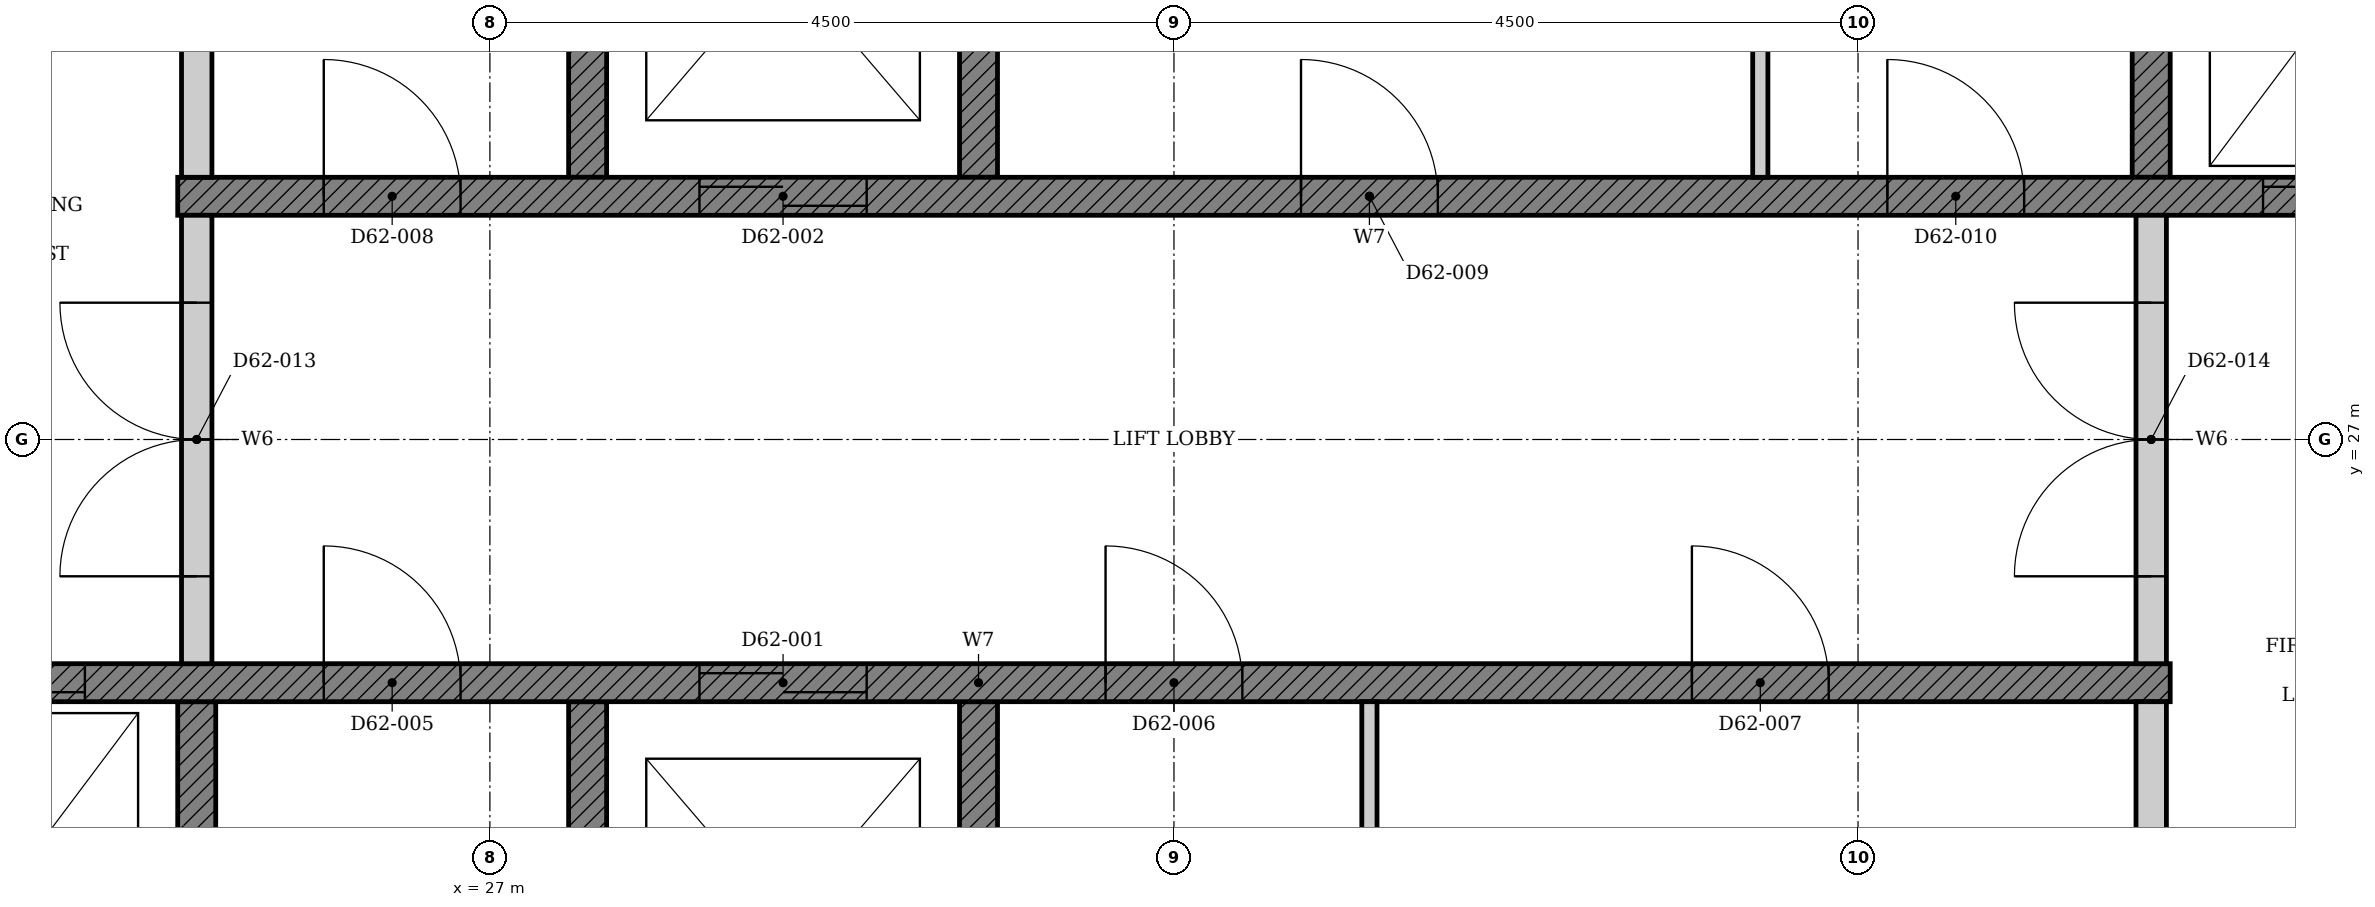
"""IFC4 building model, lengths in metres.
Left out: names, types, materials, properties, quantities, classifications, styles, units other than length and angle.
Written with IfcOpenShell. Run it as: python <this file> out.ifc"""

import sys

from ifc_helpers import new_model, si_unit, direction, frame, frame_2d, origin, place, context, subcontext, project, spatial, polyline, rectangle, outline, extrude, element, fill, save


model = new_model("IFC4")
c1 = context("Model", 3, precision=1e-05, world=origin(), true_north=direction((0.0, 1.0)))
c2 = subcontext(c1, "Body", "Model", "MODEL_VIEW")
j1 = project(units=[si_unit("LENGTHUNIT", "METRE"), si_unit("PLANEANGLEUNIT", "RADIAN")], contexts=[c1])
p1 = place(None, origin())
s1 = spatial("IfcSite", under=j1, at=p1, CompositionType="ELEMENT")
p2 = place(p1, origin())
s2 = spatial("IfcBuilding", under=s1, at=p2, CompositionType="ELEMENT")
p3 = place(p2, frame((0.0, 0.0, 245.3)))
s3 = spatial("IfcBuildingStorey", under=s2, at=p3, CompositionType="ELEMENT", Elevation=245.3)
p4 = place(p3, origin())
e1 = element("IfcWall", 1, at=p4, inside=s3, PredefinedType="SHEAR", context=c2, shape_type="SweptSolid", body=[
    extrude(outline(polyline([(22.375, 22.35), (25.197, 22.35), (25.197, 25.275), (24.947, 25.275), (24.947, 22.65), (22.625, 22.65), (22.625, 25.275), (22.375, 25.275), (22.375, 22.35)])), origin(), (0.0, 0.0, 1.0), 3.4),
])
p5 = place(p3, origin())
e2 = element("IfcWall", 2, at=p5, inside=s3, PredefinedType="SHEAR", context=c2, shape_type="SweptSolid", body=[
    extrude(outline(polyline([(27.518, 22.35), (30.339, 22.35), (30.339, 25.275), (30.089, 25.275), (30.089, 22.65), (27.768, 22.65), (27.768, 25.275), (27.518, 25.275), (27.518, 22.35)])), origin(), (0.0, 0.0, 1.0), 3.4),
])
p6 = place(p3, origin())
e3 = element("IfcWall", 3, at=p6, inside=s3, PredefinedType="SHEAR", context=c2, shape_type="SweptSolid", body=[
    extrude(outline(polyline([(27.518, 28.725), (27.768, 28.725), (27.768, 31.35), (30.089, 31.35), (30.089, 28.725), (30.339, 28.725), (30.339, 31.65), (27.518, 31.65), (27.518, 28.725)])), origin(), (0.0, 0.0, 1.0), 3.4),
])
p7 = place(p3, origin())
e4 = element("IfcWall", 4, at=p7, inside=s3, PredefinedType="SHEAR", context=c2, shape_type="SweptSolid", body=[
    extrude(outline(polyline([(37.803, 28.725), (38.053, 28.725), (38.053, 31.35), (40.375, 31.35), (40.375, 28.725), (40.625, 28.725), (40.625, 31.65), (37.803, 31.65), (37.803, 28.725)])), origin(), (0.0, 0.0, 1.0), 3.4),
])
p8 = place(p3, frame((22.375, 25.4, 0.0), z_axis=(0.0, 0.0, 1.0), x_axis=(1.0, 0.0, 0.0)))
e5 = element("IfcWall", 5, at=p8, inside=s3, PredefinedType="SHEAR", context=c2, shape_type="SweptSolid", body=[
    extrude(rectangle(XDim=15.678, YDim=0.25, at=frame_2d((7.839, 0.0))), origin(), (0.0, 0.0, 1.0), 3.4),
])
p9 = place(p8, frame((6.004, 0.0, 0.0)))
e6 = element("IfcOpeningElement", 6, at=p9, cuts=e5, PredefinedType="OPENING", context=c2, shape_type="SweptSolid", body=[
    extrude(rectangle(XDim=1.1, YDim=2.1, at=frame_2d((0.55, 1.05))), frame((0.0, 0.135, 0.0), z_axis=(0.0, -1.0, 0.0), x_axis=(1.0, 0.0, 0.0)), (0.0, 0.0, 1.0), 0.27),
])
p10 = place(p8, frame((0.861, 0.0, 0.0)))
e7 = element("IfcOpeningElement", 7, at=p10, cuts=e5, PredefinedType="OPENING", context=c2, shape_type="SweptSolid", body=[
    extrude(rectangle(XDim=1.1, YDim=2.1, at=frame_2d((0.55, 1.05))), frame((0.0, 0.135, 0.0), z_axis=(0.0, -1.0, 0.0), x_axis=(1.0, 0.0, 0.0)), (0.0, 0.0, 1.0), 0.27),
])
p11 = place(p8, frame((3.532, 0.0, 0.0)))
e8 = element("IfcOpeningElement", 8, at=p11, cuts=e5, PredefinedType="OPENING", context=c2, shape_type="SweptSolid", body=[
    extrude(rectangle(XDim=0.9, YDim=2.1, at=frame_2d((0.45, 1.05))), frame((0.0, 0.135, 0.0), z_axis=(0.0, -1.0, 0.0), x_axis=(1.0, 0.0, 0.0)), (0.0, 0.0, 1.0), 0.27),
])
p12 = place(p8, frame((8.675, 0.0, 0.0)))
e9 = element("IfcOpeningElement", 9, at=p12, cuts=e5, PredefinedType="OPENING", context=c2, shape_type="SweptSolid", body=[
    extrude(rectangle(XDim=0.9, YDim=2.1, at=frame_2d((0.45, 1.05))), frame((0.0, 0.135, 0.0), z_axis=(0.0, -1.0, 0.0), x_axis=(1.0, 0.0, 0.0)), (0.0, 0.0, 1.0), 0.27),
])
p13 = place(p8, frame((12.532, 0.0, 0.0)))
e10 = element("IfcOpeningElement", 10, at=p13, cuts=e5, PredefinedType="OPENING", context=c2, shape_type="SweptSolid", body=[
    extrude(rectangle(XDim=0.9, YDim=2.1, at=frame_2d((0.45, 1.05))), frame((0.0, 0.135, 0.0), z_axis=(0.0, -1.0, 0.0), x_axis=(1.0, 0.0, 0.0)), (0.0, 0.0, 1.0), 0.27),
])
p14 = place(p3, frame((24.947, 28.6, 0.0), z_axis=(0.0, 0.0, 1.0), x_axis=(1.0, 0.0, 0.0)))
e11 = element("IfcWall", 11, at=p14, inside=s3, PredefinedType="SHEAR", context=c2, shape_type="SweptSolid", body=[
    extrude(rectangle(XDim=15.678, YDim=0.25, at=frame_2d((7.839, 0.0))), origin(), (0.0, 0.0, 1.0), 3.4),
])
p15 = place(p14, frame((3.432, 0.0, 0.0)))
e12 = element("IfcOpeningElement", 12, at=p15, cuts=e11, PredefinedType="OPENING", context=c2, shape_type="SweptSolid", body=[
    extrude(rectangle(XDim=1.1, YDim=2.1, at=frame_2d((0.55, 1.05))), frame((0.0, 0.135, 0.0), z_axis=(0.0, -1.0, 0.0), x_axis=(1.0, 0.0, 0.0)), (0.0, 0.0, 1.0), 0.27),
])
p16 = place(p14, frame((13.718, 0.0, 0.0)))
e13 = element("IfcOpeningElement", 13, at=p16, cuts=e11, PredefinedType="OPENING", context=c2, shape_type="SweptSolid", body=[
    extrude(rectangle(XDim=1.1, YDim=2.1, at=frame_2d((0.55, 1.05))), frame((0.0, 0.135, 0.0), z_axis=(0.0, -1.0, 0.0), x_axis=(1.0, 0.0, 0.0)), (0.0, 0.0, 1.0), 0.27),
])
p17 = place(p14, frame((0.961, 0.0, 0.0)))
e14 = element("IfcOpeningElement", 14, at=p17, cuts=e11, PredefinedType="OPENING", context=c2, shape_type="SweptSolid", body=[
    extrude(rectangle(XDim=0.9, YDim=2.1, at=frame_2d((0.45, 1.05))), frame((0.0, 0.135, 0.0), z_axis=(0.0, -1.0, 0.0), x_axis=(1.0, 0.0, 0.0)), (0.0, 0.0, 1.0), 0.27),
])
p18 = place(p14, frame((7.389, 0.0, 0.0)))
e15 = element("IfcOpeningElement", 15, at=p18, cuts=e11, PredefinedType="OPENING", context=c2, shape_type="SweptSolid", body=[
    extrude(rectangle(XDim=0.9, YDim=2.1, at=frame_2d((0.45, 1.05))), frame((0.0, 0.135, 0.0), z_axis=(0.0, -1.0, 0.0), x_axis=(1.0, 0.0, 0.0)), (0.0, 0.0, 1.0), 0.27),
])
p19 = place(p14, frame((11.246, 0.0, 0.0)))
e16 = element("IfcOpeningElement", 16, at=p19, cuts=e11, PredefinedType="OPENING", context=c2, shape_type="SweptSolid", body=[
    extrude(rectangle(XDim=0.9, YDim=2.1, at=frame_2d((0.45, 1.05))), frame((0.0, 0.135, 0.0), z_axis=(0.0, -1.0, 0.0), x_axis=(1.0, 0.0, 0.0)), (0.0, 0.0, 1.0), 0.27),
])
p20 = place(p3, frame((37.928, 22.65, 0.0), z_axis=(0.0, 0.0, 1.0), x_axis=(0.0, 1.0, 0.0)))
e17 = element("IfcWall", 17, at=p20, inside=s3, PredefinedType="PARTITIONING", context=c2, shape_type="SweptSolid", body=[
    extrude(rectangle(XDim=2.625, YDim=0.2, at=frame_2d((1.312, 0.0))), origin(), (0.0, 0.0, 1.0), 3.4),
])
p21 = place(p3, frame((32.786, 22.65, 0.0), z_axis=(0.0, 0.0, 1.0), x_axis=(0.0, 1.0, 0.0)))
e18 = element("IfcWall", 18, at=p21, inside=s3, PredefinedType="PARTITIONING", context=c2, shape_type="SweptSolid", body=[
    extrude(rectangle(XDim=2.625, YDim=0.1, at=frame_2d((1.312, 0.0))), origin(), (0.0, 0.0, 1.0), 3.4),
])
p22 = place(p3, frame((25.072, 28.725, 0.0), z_axis=(0.0, 0.0, 1.0), x_axis=(0.0, 1.0, 0.0)))
e19 = element("IfcWall", 19, at=p22, inside=s3, PredefinedType="PARTITIONING", context=c2, shape_type="SweptSolid", body=[
    extrude(rectangle(XDim=2.625, YDim=0.2, at=frame_2d((1.312, 0.0))), origin(), (0.0, 0.0, 1.0), 3.4),
])
p23 = place(p3, frame((35.357, 28.725, 0.0), z_axis=(0.0, 0.0, 1.0), x_axis=(0.0, 1.0, 0.0)))
e20 = element("IfcWall", 20, at=p23, inside=s3, PredefinedType="PARTITIONING", context=c2, shape_type="SweptSolid", body=[
    extrude(rectangle(XDim=2.625, YDim=0.1, at=frame_2d((1.312, 0.0))), origin(), (0.0, 0.0, 1.0), 3.4),
])
p24 = place(p3, frame((25.072, 25.525, 0.0), z_axis=(0.0, 0.0, 1.0), x_axis=(0.0, 1.0, 0.0)))
e21 = element("IfcWall", 21, at=p24, inside=s3, PredefinedType="PARTITIONING", context=c2, shape_type="SweptSolid", body=[
    extrude(rectangle(XDim=2.95, YDim=0.2, at=frame_2d((1.475, 0.0))), origin(), (0.0, 0.0, 1.0), 3.4),
])
p25 = place(p24, frame((0.575, 0.0, 0.0)))
e22 = element("IfcOpeningElement", 22, at=p25, cuts=e21, PredefinedType="OPENING", context=c2, shape_type="SweptSolid", body=[
    extrude(rectangle(XDim=1.8, YDim=2.1, at=frame_2d((0.9, 1.05))), frame((0.0, 0.11, 0.0), z_axis=(0.0, -1.0, 0.0), x_axis=(1.0, 0.0, 0.0)), (0.0, 0.0, 1.0), 0.22),
])
p26 = place(p3, frame((37.928, 25.525, 0.0), z_axis=(0.0, 0.0, 1.0), x_axis=(0.0, 1.0, 0.0)))
e23 = element("IfcWall", 23, at=p26, inside=s3, PredefinedType="PARTITIONING", context=c2, shape_type="SweptSolid", body=[
    extrude(rectangle(XDim=2.95, YDim=0.2, at=frame_2d((1.475, 0.0))), origin(), (0.0, 0.0, 1.0), 3.4),
])
p27 = place(p26, frame((0.575, 0.0, 0.0)))
e24 = element("IfcOpeningElement", 24, at=p27, cuts=e23, PredefinedType="OPENING", context=c2, shape_type="SweptSolid", body=[
    extrude(rectangle(XDim=1.8, YDim=2.1, at=frame_2d((0.9, 1.05))), frame((0.0, 0.11, 0.0), z_axis=(0.0, -1.0, 0.0), x_axis=(1.0, 0.0, 0.0)), (0.0, 0.0, 1.0), 0.22),
])
p28 = place(p9, origin())
e25 = element("IfcDoor", 25, at=p28, inside=s3, OperationType="DOUBLE_DOOR_SLIDING", PredefinedType="DOOR", context=c2, shape_type="SweptSolid", body=[
    extrude(rectangle(XDim=1.1, YDim=2.1, at=frame_2d((0.55, 1.05))), frame((0.0, 0.025, 0.0), z_axis=(0.0, -1.0, 0.0), x_axis=(1.0, 0.0, 0.0)), (0.0, 0.0, 1.0), 0.05),
])
fill(e6, e25)
p29 = place(p15, origin())
e26 = element("IfcDoor", 26, at=p29, inside=s3, OperationType="DOUBLE_DOOR_SLIDING", PredefinedType="DOOR", context=c2, shape_type="SweptSolid", body=[
    extrude(rectangle(XDim=1.1, YDim=2.1, at=frame_2d((0.55, 1.05))), frame((0.0, 0.025, 0.0), z_axis=(0.0, -1.0, 0.0), x_axis=(1.0, 0.0, 0.0)), (0.0, 0.0, 1.0), 0.05),
])
fill(e12, e26)
p30 = place(p10, origin())
e27 = element("IfcDoor", 27, at=p30, inside=s3, OperationType="DOUBLE_DOOR_SLIDING", PredefinedType="DOOR", context=c2, shape_type="SweptSolid", body=[
    extrude(rectangle(XDim=1.1, YDim=2.1, at=frame_2d((0.55, 1.05))), frame((0.0, 0.025, 0.0), z_axis=(0.0, -1.0, 0.0), x_axis=(1.0, 0.0, 0.0)), (0.0, 0.0, 1.0), 0.05),
])
fill(e7, e27)
p31 = place(p16, origin())
e28 = element("IfcDoor", 28, at=p31, inside=s3, OperationType="DOUBLE_DOOR_SLIDING", PredefinedType="DOOR", context=c2, shape_type="SweptSolid", body=[
    extrude(rectangle(XDim=1.1, YDim=2.1, at=frame_2d((0.55, 1.05))), frame((0.0, 0.025, 0.0), z_axis=(0.0, -1.0, 0.0), x_axis=(1.0, 0.0, 0.0)), (0.0, 0.0, 1.0), 0.05),
])
fill(e13, e28)
p32 = place(p11, origin())
e29 = element("IfcDoor", 29, at=p32, inside=s3, OperationType="SINGLE_SWING_LEFT", PredefinedType="DOOR", context=c2, shape_type="SweptSolid", body=[
    extrude(rectangle(XDim=0.9, YDim=2.1, at=frame_2d((0.45, 1.05))), frame((0.0, 0.025, 0.0), z_axis=(0.0, -1.0, 0.0), x_axis=(1.0, 0.0, 0.0)), (0.0, 0.0, 1.0), 0.05),
])
fill(e8, e29)
p33 = place(p12, origin())
e30 = element("IfcDoor", 30, at=p33, inside=s3, OperationType="SINGLE_SWING_LEFT", PredefinedType="DOOR", context=c2, shape_type="SweptSolid", body=[
    extrude(rectangle(XDim=0.9, YDim=2.1, at=frame_2d((0.45, 1.05))), frame((0.0, 0.025, 0.0), z_axis=(0.0, -1.0, 0.0), x_axis=(1.0, 0.0, 0.0)), (0.0, 0.0, 1.0), 0.05),
])
fill(e9, e30)
p34 = place(p13, origin())
e31 = element("IfcDoor", 31, at=p34, inside=s3, OperationType="SINGLE_SWING_LEFT", PredefinedType="DOOR", context=c2, shape_type="SweptSolid", body=[
    extrude(rectangle(XDim=0.9, YDim=2.1, at=frame_2d((0.45, 1.05))), frame((0.0, 0.025, 0.0), z_axis=(0.0, -1.0, 0.0), x_axis=(1.0, 0.0, 0.0)), (0.0, 0.0, 1.0), 0.05),
])
fill(e10, e31)
p35 = place(p17, origin())
e32 = element("IfcDoor", 32, at=p35, inside=s3, OperationType="SINGLE_SWING_LEFT", PredefinedType="DOOR", context=c2, shape_type="SweptSolid", body=[
    extrude(rectangle(XDim=0.9, YDim=2.1, at=frame_2d((0.45, 1.05))), frame((0.0, 0.025, 0.0), z_axis=(0.0, -1.0, 0.0), x_axis=(1.0, 0.0, 0.0)), (0.0, 0.0, 1.0), 0.05),
])
fill(e14, e32)
p36 = place(p18, origin())
e33 = element("IfcDoor", 33, at=p36, inside=s3, OperationType="SINGLE_SWING_LEFT", PredefinedType="DOOR", context=c2, shape_type="SweptSolid", body=[
    extrude(rectangle(XDim=0.9, YDim=2.1, at=frame_2d((0.45, 1.05))), frame((0.0, 0.025, 0.0), z_axis=(0.0, -1.0, 0.0), x_axis=(1.0, 0.0, 0.0)), (0.0, 0.0, 1.0), 0.05),
])
fill(e15, e33)
p37 = place(p19, origin())
e34 = element("IfcDoor", 34, at=p37, inside=s3, OperationType="SINGLE_SWING_LEFT", PredefinedType="DOOR", context=c2, shape_type="SweptSolid", body=[
    extrude(rectangle(XDim=0.9, YDim=2.1, at=frame_2d((0.45, 1.05))), frame((0.0, 0.025, 0.0), z_axis=(0.0, -1.0, 0.0), x_axis=(1.0, 0.0, 0.0)), (0.0, 0.0, 1.0), 0.05),
])
fill(e16, e34)
p38 = place(p25, origin())
e35 = element("IfcDoor", 35, at=p38, inside=s3, OperationType="DOUBLE_DOOR_SINGLE_SWING", PredefinedType="DOOR", context=c2, shape_type="SweptSolid", body=[
    extrude(rectangle(XDim=1.8, YDim=2.1, at=frame_2d((0.9, 1.05))), frame((0.0, 0.025, 0.0), z_axis=(0.0, -1.0, 0.0), x_axis=(1.0, 0.0, 0.0)), (0.0, 0.0, 1.0), 0.05),
])
fill(e22, e35)
p39 = place(p27, origin())
e36 = element("IfcDoor", 36, at=p39, inside=s3, OperationType="DOUBLE_DOOR_SINGLE_SWING", PredefinedType="DOOR", context=c2, shape_type="SweptSolid", body=[
    extrude(rectangle(XDim=1.8, YDim=2.1, at=frame_2d((0.9, 1.05))), frame((0.0, 0.025, 0.0), z_axis=(0.0, -1.0, 0.0), x_axis=(1.0, 0.0, 0.0)), (0.0, 0.0, 1.0), 0.05),
])
fill(e24, e36)
save(model, sys.argv[1])
